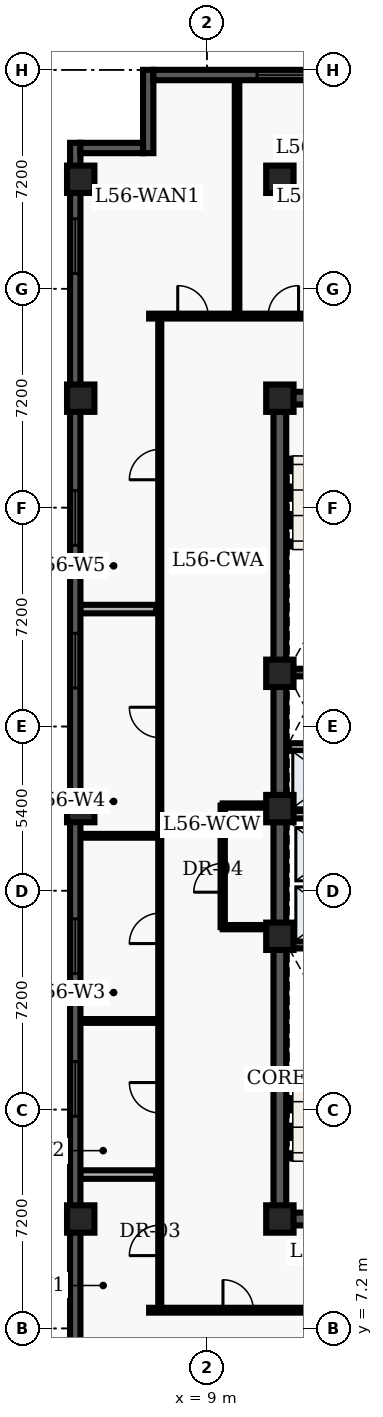
"""IFC4 building model, lengths in metres.
Left out: names, types, materials, properties, quantities, classifications, styles, units other than length and angle.
Written with IfcOpenShell. Run it as: python <this file> out.ifc"""

import sys

from ifc_helpers import new_model, entity, si_unit, converted_unit, direction, frame, origin_with_axes, origin_2d_with_axis, place, context, subcontext, project, spatial, polyline, rectangle, outline, extrude, element, fill, save


model = new_model("IFC4")
c1 = context("Model", 3, precision=1e-05, world=origin_with_axes(), true_north=direction((0.0, 1.0)))
c2 = subcontext(c1, "Body", "Model", "MODEL_VIEW")
j1 = project(units=[si_unit("LENGTHUNIT", "METRE"), converted_unit("PLANEANGLEUNIT", "DEGREE", entity("IfcPlaneAngleMeasure", 0.017), si_unit("PLANEANGLEUNIT", "RADIAN"), dimensions=[0, 0, 0, 0, 0, 0, 0])], contexts=[c1])
p1 = place(None, origin_with_axes())
s1 = spatial("IfcSite", under=j1, at=p1, CompositionType="ELEMENT")
p2 = place(p1, origin_with_axes())
s2 = spatial("IfcBuilding", under=s1, at=p2, CompositionType="ELEMENT")
p3 = place(p2, frame((0.0, 0.0, 228.6), z_axis=(0.0, 0.0, 1.0), x_axis=(1.0, 0.0, 0.0)))
s3 = spatial("IfcBuildingStorey", under=s2, at=p3, CompositionType="ELEMENT", Elevation=228.6)
p4 = place(p3, frame((11.4, 10.8, 0.0), z_axis=(0.0, 0.0, 1.0), x_axis=(0.0, 1.0, 0.0)))
e1 = element("IfcWall", 1, at=p4, inside=s3, PredefinedType="SHEAR", context=c2, shape_type="SweptSolid", body=[
    extrude(outline(polyline([(0.0, -0.21), (27.0, -0.21), (27.0, 0.21), (0.0, 0.21), (0.0, -0.21)])), origin_with_axes(), (0.0, 0.0, 1.0), 3.66),
])
p5 = place(p3, frame((11.4, 10.8, 0.0), z_axis=(0.0, 0.0, 1.0), x_axis=(1.0, 0.0, 0.0)))
e2 = element("IfcWall", 2, at=p5, inside=s3, PredefinedType="SHEAR", context=c2, shape_type="SweptSolid", body=[
    extrude(outline(polyline([(0.0, -0.21), (7.2, -0.21), (7.2, 0.21), (0.0, 0.21), (0.0, -0.21)])), origin_with_axes(), (0.0, 0.0, 1.0), 3.66),
])
p6 = place(p5, frame((2.625, 0.0, 0.0), z_axis=(0.0, 0.0, 1.0), x_axis=(1.0, 0.0, 0.0)))
e3 = element("IfcOpeningElement", 3, at=p6, cuts=e2, PredefinedType="OPENING", context=c2, shape_type="SweptSolid", body=[
    extrude(rectangle(XDim=1.05, YDim=0.44, at=origin_2d_with_axis()), origin_with_axes(), (0.0, 0.0, 1.0), 2.15),
])
p7 = place(p3, frame((11.4, 37.8, 0.0), z_axis=(0.0, 0.0, 1.0), x_axis=(1.0, 0.0, 0.0)))
e4 = element("IfcWall", 4, at=p7, inside=s3, PredefinedType="SHEAR", context=c2, shape_type="SweptSolid", body=[
    extrude(outline(polyline([(0.0, -0.21), (7.2, -0.21), (7.2, 0.21), (0.0, 0.21), (0.0, -0.21)])), origin_with_axes(), (0.0, 0.0, 1.0), 3.66),
])
p8 = place(p7, frame((2.625, 0.0, 0.0), z_axis=(0.0, 0.0, 1.0), x_axis=(1.0, 0.0, 0.0)))
e5 = element("IfcOpeningElement", 5, at=p8, cuts=e4, PredefinedType="OPENING", context=c2, shape_type="SweptSolid", body=[
    extrude(rectangle(XDim=1.05, YDim=0.44, at=origin_2d_with_axis()), origin_with_axes(), (0.0, 0.0, 1.0), 2.15),
])
for number, where, z_axis, x_axis in (
    (6, (11.61, 19.825, 0.0), (0.0, 0.0, 1.0), (1.0, 0.0, 0.0)),
    (7, (11.61, 28.775, 0.0), (0.0, 0.0, 1.0), (1.0, 0.0, 0.0)),
):
    element("IfcWall", number, at=place(p3, frame(where, z_axis=z_axis, x_axis=x_axis)), inside=s3, PredefinedType="SHEAR", context=c2, shape_type="SweptSolid", body=[
        extrude(outline(polyline([(0.0, -0.125), (6.78, -0.125), (6.78, 0.125), (0.0, 0.125), (0.0, -0.125)])), origin_with_axes(), (0.0, 0.0, 1.0), 3.66),
    ])
p9 = place(p3, frame((11.7, 24.1, 0.0), z_axis=(0.0, 0.0, 1.0), x_axis=(1.0, 0.0, 0.0)))
e8 = element("IfcWall", 8, at=p9, inside=s3, PredefinedType="SOLIDWALL", context=c2, shape_type="SweptSolid", body=[
    extrude(outline(polyline([(0.0, -0.125), (6.6, -0.125), (6.6, 0.125), (0.0, 0.125), (0.0, -0.125)])), origin_with_axes(), (0.0, 0.0, 1.0), 2.7),
])
p10 = place(p9, frame((3.75, 0.0, 0.0), z_axis=(0.0, 0.0, 1.0), x_axis=(1.0, 0.0, 0.0)))
e9 = element("IfcOpeningElement", 9, at=p10, cuts=e8, PredefinedType="OPENING", context=c2, shape_type="SweptSolid", body=[
    extrude(rectangle(XDim=0.9, YDim=0.27, at=origin_2d_with_axis()), origin_with_axes(), (0.0, 0.0, 1.0), 2.15),
])
p11 = place(p3, frame((11.7, 26.325, 0.0), z_axis=(0.0, 0.0, 1.0), x_axis=(1.0, 0.0, 0.0)))
e10 = element("IfcWall", 10, at=p11, inside=s3, PredefinedType="SOLIDWALL", context=c2, shape_type="SweptSolid", body=[
    extrude(outline(polyline([(0.0, -0.125), (6.6, -0.125), (6.6, 0.125), (0.0, 0.125), (0.0, -0.125)])), origin_with_axes(), (0.0, 0.0, 1.0), 2.7),
])
p12 = place(p11, frame((3.5, 0.0, 0.0), z_axis=(0.0, 0.0, 1.0), x_axis=(1.0, 0.0, 0.0)))
e11 = element("IfcOpeningElement", 11, at=p12, cuts=e10, PredefinedType="OPENING", context=c2, shape_type="SweptSolid", body=[
    extrude(rectangle(XDim=0.9, YDim=0.27, at=origin_2d_with_axis()), origin_with_axes(), (0.0, 0.0, 1.0), 2.15),
])
for number, where, z_axis, x_axis in (
    (12, (11.4, 10.8, 0.0), (0.0, 0.0, 1.0), (1.0, 0.0, 0.0)),
    (13, (11.4, 20.1, 0.0), (0.0, 0.0, 1.0), (1.0, 0.0, 0.0)),
    (14, (11.4, 24.3, 0.0), (0.0, 0.0, 1.0), (1.0, 0.0, 0.0)),
    (15, (11.4, 28.75, 0.0), (0.0, 0.0, 1.0), (1.0, 0.0, 0.0)),
    (16, (11.4, 37.8, 0.0), (0.0, 0.0, 1.0), (1.0, 0.0, 0.0)),
    (17, (11.4, 45.0, 0.0), (0.0, 0.0, 1.0), (1.0, 0.0, 0.0)),
    (18, (4.85, 10.8, 0.0), (0.0, 0.0, 1.0), (1.0, 0.0, 0.0)),
    (19, (4.85, 24.3, 0.0), (0.0, 0.0, 1.0), (1.0, 0.0, 0.0)),
    (20, (4.85, 37.8, 0.0), (0.0, 0.0, 1.0), (1.0, 0.0, 0.0)),
    (21, (4.85, 45.0, 0.0), (0.0, 0.0, 1.0), (1.0, 0.0, 0.0)),
):
    element("IfcColumn", number, at=place(p3, frame(where, z_axis=z_axis, x_axis=x_axis)), inside=s3, PredefinedType="COLUMN", context=c2, shape_type="SweptSolid", body=[
        extrude(rectangle(XDim=0.9, YDim=0.9, at=origin_2d_with_axis()), origin_with_axes(), (0.0, 0.0, 1.0), 3.9),
    ])
p13 = place(p3, frame((9.52, 20.4, 0.0), z_axis=(0.0, 0.0, 1.0), x_axis=(0.0, 1.0, 0.0)))
e22 = element("IfcWall", 22, at=p13, inside=s3, PredefinedType="PARTITIONING", context=c2, shape_type="SweptSolid", body=[
    extrude(outline(polyline([(0.0, -0.07), (4.0, -0.07), (4.0, 0.07), (0.0, 0.07), (0.0, -0.07)])), origin_with_axes(), (0.0, 0.0, 1.0), 2.7),
])
p14 = place(p13, frame((1.625, 0.0, 0.0), z_axis=(0.0, 0.0, 1.0), x_axis=(1.0, 0.0, 0.0)))
e23 = element("IfcOpeningElement", 23, at=p14, cuts=e22, PredefinedType="OPENING", context=c2, shape_type="SweptSolid", body=[
    extrude(rectangle(XDim=0.95, YDim=0.16, at=origin_2d_with_axis()), origin_with_axes(), (0.0, 0.0, 1.0), 2.15),
])
for number, where, z_axis, x_axis in (
    (24, (9.52, 20.4, 0.0), (0.0, 0.0, 1.0), (1.0, 0.0, 0.0)),
    (25, (9.52, 24.4, 0.0), (0.0, 0.0, 1.0), (1.0, 0.0, 0.0)),
):
    element("IfcWall", number, at=place(p3, frame(where, z_axis=z_axis, x_axis=x_axis)), inside=s3, PredefinedType="PARTITIONING", context=c2, shape_type="SweptSolid", body=[
        extrude(outline(polyline([(0.0, -0.07), (1.58, -0.07), (1.58, 0.07), (0.0, 0.07), (0.0, -0.07)])), origin_with_axes(), (0.0, 0.0, 1.0), 2.7),
    ])
p15 = place(p3, frame((7.1, 7.8, 0.0), z_axis=(0.0, 0.0, 1.0), x_axis=(1.0, 0.0, 0.0)))
e26 = element("IfcWall", 26, at=p15, inside=s3, PredefinedType="PARTITIONING", context=c2, shape_type="SweptSolid", body=[
    extrude(outline(polyline([(0.0, -0.08), (13.2, -0.08), (13.2, 0.08), (0.0, 0.08), (0.0, -0.08)])), origin_with_axes(), (0.0, 0.0, 1.0), 2.7),
])
p16 = place(p15, frame((2.929, 0.0, 0.0), z_axis=(0.0, 0.0, 1.0), x_axis=(1.0, 0.0, 0.0)))
e27 = element("IfcOpeningElement", 27, at=p16, cuts=e26, PredefinedType="OPENING", context=c2, shape_type="SweptSolid", body=[
    extrude(rectangle(XDim=1.0, YDim=0.18, at=origin_2d_with_axis()), origin_with_axes(), (0.0, 0.0, 1.0), 2.15),
])
p17 = place(p15, frame((7.56, 0.0, 0.0), z_axis=(0.0, 0.0, 1.0), x_axis=(1.0, 0.0, 0.0)))
e28 = element("IfcOpeningElement", 28, at=p17, cuts=e26, PredefinedType="OPENING", context=c2, shape_type="SweptSolid", body=[
    extrude(rectangle(XDim=1.0, YDim=0.18, at=origin_2d_with_axis()), origin_with_axes(), (0.0, 0.0, 1.0), 2.15),
])
p18 = place(p15, frame((11.201, 0.0, 0.0), z_axis=(0.0, 0.0, 1.0), x_axis=(1.0, 0.0, 0.0)))
e29 = element("IfcOpeningElement", 29, at=p18, cuts=e26, PredefinedType="OPENING", context=c2, shape_type="SweptSolid", body=[
    extrude(rectangle(XDim=1.0, YDim=0.18, at=origin_2d_with_axis()), origin_with_axes(), (0.0, 0.0, 1.0), 2.15),
])
p19 = place(p3, frame((7.1, 40.5, 0.0), z_axis=(0.0, 0.0, 1.0), x_axis=(1.0, 0.0, 0.0)))
e30 = element("IfcWall", 30, at=p19, inside=s3, PredefinedType="PARTITIONING", context=c2, shape_type="SweptSolid", body=[
    extrude(outline(polyline([(0.0, -0.08), (24.965, -0.08), (24.965, 0.08), (0.0, 0.08), (0.0, -0.08)])), origin_with_axes(), (0.0, 0.0, 1.0), 2.7),
])
p20 = place(p19, frame((1.441, 0.0, 0.0), z_axis=(0.0, 0.0, 1.0), x_axis=(1.0, 0.0, 0.0)))
e31 = element("IfcOpeningElement", 31, at=p20, cuts=e30, PredefinedType="OPENING", context=c2, shape_type="SweptSolid", body=[
    extrude(rectangle(XDim=1.0, YDim=0.18, at=origin_2d_with_axis()), origin_with_axes(), (0.0, 0.0, 1.0), 2.15),
])
p21 = place(p19, frame((4.415, 0.0, 0.0), z_axis=(0.0, 0.0, 1.0), x_axis=(1.0, 0.0, 0.0)))
e32 = element("IfcOpeningElement", 32, at=p21, cuts=e30, PredefinedType="OPENING", context=c2, shape_type="SweptSolid", body=[
    extrude(rectangle(XDim=1.0, YDim=0.18, at=origin_2d_with_axis()), origin_with_axes(), (0.0, 0.0, 1.0), 2.15),
])
p22 = place(p19, frame((7.614, 0.0, 0.0), z_axis=(0.0, 0.0, 1.0), x_axis=(1.0, 0.0, 0.0)))
e33 = element("IfcOpeningElement", 33, at=p22, cuts=e30, PredefinedType="OPENING", context=c2, shape_type="SweptSolid", body=[
    extrude(rectangle(XDim=1.0, YDim=0.18, at=origin_2d_with_axis()), origin_with_axes(), (0.0, 0.0, 1.0), 2.15),
])
p23 = place(p19, frame((11.156, 0.0, 0.0), z_axis=(0.0, 0.0, 1.0), x_axis=(1.0, 0.0, 0.0)))
e34 = element("IfcOpeningElement", 34, at=p23, cuts=e30, PredefinedType="OPENING", context=c2, shape_type="SweptSolid", body=[
    extrude(rectangle(XDim=1.0, YDim=0.18, at=origin_2d_with_axis()), origin_with_axes(), (0.0, 0.0, 1.0), 2.15),
])
p24 = place(p3, frame((7.45, 7.8, 0.0), z_axis=(0.0, 0.0, 1.0), x_axis=(0.0, 1.0, 0.0)))
e35 = element("IfcWall", 35, at=p24, inside=s3, PredefinedType="PARTITIONING", context=c2, shape_type="SweptSolid", body=[
    extrude(outline(polyline([(0.0, -0.05), (32.7, -0.05), (32.7, 0.05), (0.0, 0.05), (0.0, -0.05)])), origin_with_axes(), (0.0, 0.0, 1.0), 2.7),
])
p25 = place(p24, frame((2.296, 0.0, 0.0), z_axis=(0.0, 0.0, 1.0), x_axis=(1.0, 0.0, 0.0)))
e36 = element("IfcOpeningElement", 36, at=p25, cuts=e35, PredefinedType="OPENING", context=c2, shape_type="SweptSolid", body=[
    extrude(rectangle(XDim=1.0, YDim=0.12, at=origin_2d_with_axis()), origin_with_axes(), (0.0, 0.0, 1.0), 2.15),
])
p26 = place(p24, frame((6.989, 0.0, 0.0), z_axis=(0.0, 0.0, 1.0), x_axis=(1.0, 0.0, 0.0)))
e37 = element("IfcOpeningElement", 37, at=p26, cuts=e35, PredefinedType="OPENING", context=c2, shape_type="SweptSolid", body=[
    extrude(rectangle(XDim=1.0, YDim=0.12, at=origin_2d_with_axis()), origin_with_axes(), (0.0, 0.0, 1.0), 2.15),
])
p27 = place(p24, frame((12.56, 0.0, 0.0), z_axis=(0.0, 0.0, 1.0), x_axis=(1.0, 0.0, 0.0)))
e38 = element("IfcOpeningElement", 38, at=p27, cuts=e35, PredefinedType="OPENING", context=c2, shape_type="SweptSolid", body=[
    extrude(rectangle(XDim=1.0, YDim=0.12, at=origin_2d_with_axis()), origin_with_axes(), (0.0, 0.0, 1.0), 2.15),
])
p28 = place(p24, frame((19.334, 0.0, 0.0), z_axis=(0.0, 0.0, 1.0), x_axis=(1.0, 0.0, 0.0)))
e39 = element("IfcOpeningElement", 39, at=p28, cuts=e35, PredefinedType="OPENING", context=c2, shape_type="SweptSolid", body=[
    extrude(rectangle(XDim=1.0, YDim=0.12, at=origin_2d_with_axis()), origin_with_axes(), (0.0, 0.0, 1.0), 2.15),
])
p29 = place(p24, frame((27.817, 0.0, 0.0), z_axis=(0.0, 0.0, 1.0), x_axis=(1.0, 0.0, 0.0)))
e40 = element("IfcOpeningElement", 40, at=p29, cuts=e35, PredefinedType="OPENING", context=c2, shape_type="SweptSolid", body=[
    extrude(rectangle(XDim=1.0, YDim=0.12, at=origin_2d_with_axis()), origin_with_axes(), (0.0, 0.0, 1.0), 2.15),
])
p30 = place(p3, frame((4.835, 12.262, 0.0), z_axis=(0.0, 0.0, 1.0), x_axis=(1.0, 0.0, 0.0)))
e41 = element("IfcWall", 41, at=p30, inside=s3, PredefinedType="PARTITIONING", context=c2, shape_type="SweptSolid", body=[
    extrude(outline(polyline([(0.0, -0.14), (2.495, -0.14), (2.495, 0.14), (0.0, 0.14), (0.0, -0.14)])), origin_with_axes(), (0.0, 0.0, 1.0), 2.7),
])
for number, where, z_axis, x_axis in (
    (42, (4.835, 17.315, 0.0), (0.0, 0.0, 1.0), (1.0, 0.0, 0.0)),
    (43, (4.835, 23.405, 0.0), (0.0, 0.0, 1.0), (1.0, 0.0, 0.0)),
):
    element("IfcWall", number, at=place(p3, frame(where, z_axis=z_axis, x_axis=x_axis)), inside=s3, PredefinedType="PARTITIONING", context=c2, shape_type="SweptSolid", body=[
        extrude(outline(polyline([(0.0, -0.062), (2.495, -0.062), (2.495, 0.062), (0.0, 0.062), (0.0, -0.062)])), origin_with_axes(), (0.0, 0.0, 1.0), 2.7),
    ])
p31 = place(p3, frame((4.835, 30.863, 0.0), z_axis=(0.0, 0.0, 1.0), x_axis=(1.0, 0.0, 0.0)))
e44 = element("IfcWall", 44, at=p31, inside=s3, PredefinedType="PARTITIONING", context=c2, shape_type="SweptSolid", body=[
    extrude(outline(polyline([(0.0, -0.14), (2.495, -0.14), (2.495, 0.14), (0.0, 0.14), (0.0, -0.14)])), origin_with_axes(), (0.0, 0.0, 1.0), 2.7),
])
p32 = place(p3, frame((9.992, 40.6, 0.0), z_axis=(0.0, 0.0, 1.0), x_axis=(0.0, 1.0, 0.0)))
e45 = element("IfcWall", 45, at=p32, inside=s3, PredefinedType="PARTITIONING", context=c2, shape_type="SweptSolid", body=[
    extrude(outline(polyline([(0.0, -0.075), (7.665, -0.075), (7.665, 0.075), (0.0, 0.075), (0.0, -0.075)])), origin_with_axes(), (0.0, 0.0, 1.0), 2.7),
])
p33 = place(p3, frame((4.67, 2.74, 0.0), z_axis=(0.0, 0.0, 1.0), x_axis=(0.0, 1.0, 0.0)))
e46 = element("IfcWall", 46, at=p33, inside=s3, PredefinedType="SOLIDWALL", context=c2, shape_type="SweptSolid", body=[
    extrude(outline(polyline([(0.0, -0.17), (43.46, -0.17), (43.46, 0.17), (0.0, 0.17), (0.0, -0.17)])), origin_with_axes(), (0.0, 0.0, 1.0), 3.66),
])
p34 = place(p33, frame((2.948, 0.0, 0.45), z_axis=(0.0, 0.0, 1.0), x_axis=(1.0, 0.0, 0.0)))
e47 = element("IfcOpeningElement", 47, at=p34, cuts=e46, PredefinedType="OPENING", context=c2, shape_type="SweptSolid", body=[
    extrude(rectangle(XDim=1.8, YDim=0.36, at=origin_2d_with_axis()), origin_with_axes(), (0.0, 0.0, 1.0), 2.1),
])
p35 = place(p33, frame((12.339, 0.0, 0.45), z_axis=(0.0, 0.0, 1.0), x_axis=(1.0, 0.0, 0.0)))
e48 = element("IfcOpeningElement", 48, at=p35, cuts=e46, PredefinedType="OPENING", context=c2, shape_type="SweptSolid", body=[
    extrude(rectangle(XDim=1.8, YDim=0.36, at=origin_2d_with_axis()), origin_with_axes(), (0.0, 0.0, 1.0), 2.1),
])
p36 = place(p33, frame((17.034, 0.0, 0.45), z_axis=(0.0, 0.0, 1.0), x_axis=(1.0, 0.0, 0.0)))
e49 = element("IfcOpeningElement", 49, at=p36, cuts=e46, PredefinedType="OPENING", context=c2, shape_type="SweptSolid", body=[
    extrude(rectangle(XDim=1.8, YDim=0.36, at=origin_2d_with_axis()), origin_with_axes(), (0.0, 0.0, 1.0), 2.1),
])
p37 = place(p33, frame((26.426, 0.0, 0.45), z_axis=(0.0, 0.0, 1.0), x_axis=(1.0, 0.0, 0.0)))
e50 = element("IfcOpeningElement", 50, at=p37, cuts=e46, PredefinedType="OPENING", context=c2, shape_type="SweptSolid", body=[
    extrude(rectangle(XDim=1.8, YDim=0.36, at=origin_2d_with_axis()), origin_with_axes(), (0.0, 0.0, 1.0), 2.1),
])
p38 = place(p33, frame((31.121, 0.0, 0.45), z_axis=(0.0, 0.0, 1.0), x_axis=(1.0, 0.0, 0.0)))
e51 = element("IfcOpeningElement", 51, at=p38, cuts=e46, PredefinedType="OPENING", context=c2, shape_type="SweptSolid", body=[
    extrude(rectangle(XDim=1.8, YDim=0.36, at=origin_2d_with_axis()), origin_with_axes(), (0.0, 0.0, 1.0), 2.1),
])
p39 = place(p33, frame((40.062, 0.0, 0.45), z_axis=(0.0, 0.0, 1.0), x_axis=(1.0, 0.0, 0.0)))
e52 = element("IfcOpeningElement", 52, at=p39, cuts=e46, PredefinedType="OPENING", context=c2, shape_type="SweptSolid", body=[
    extrude(rectangle(XDim=1.8, YDim=0.36, at=origin_2d_with_axis()), origin_with_axes(), (0.0, 0.0, 1.0), 2.1),
])
p40 = place(p3, frame((4.84, 46.03, 0.0), z_axis=(0.0, 0.0, 1.0), x_axis=(1.0, 0.0, 0.0)))
e53 = element("IfcWall", 53, at=p40, inside=s3, PredefinedType="SOLIDWALL", context=c2, shape_type="SweptSolid", body=[
    extrude(outline(polyline([(0.0, -0.17), (2.06, -0.17), (2.06, 0.17), (0.0, 0.17), (0.0, -0.17)])), origin_with_axes(), (0.0, 0.0, 1.0), 3.66),
])
p41 = place(p3, frame((7.07, 45.86, 0.0), z_axis=(0.0, 0.0, 1.0), x_axis=(0.0, 1.0, 0.0)))
e54 = element("IfcWall", 54, at=p41, inside=s3, PredefinedType="SOLIDWALL", context=c2, shape_type="SweptSolid", body=[
    extrude(outline(polyline([(0.0, -0.17), (2.74, -0.17), (2.74, 0.17), (0.0, 0.17), (0.0, -0.17)])), origin_with_axes(), (0.0, 0.0, 1.0), 3.66),
])
p42 = place(p3, frame((7.24, 48.43, 0.0), z_axis=(0.0, 0.0, 1.0), x_axis=(1.0, 0.0, 0.0)))
e55 = element("IfcWall", 55, at=p42, inside=s3, PredefinedType="SOLIDWALL", context=c2, shape_type="SweptSolid", body=[
    extrude(outline(polyline([(0.0, -0.17), (18.36, -0.17), (18.36, 0.17), (0.0, 0.17), (0.0, -0.17)])), origin_with_axes(), (0.0, 0.0, 1.0), 3.66),
])
p43 = place(p42, frame((4.31, 0.0, 0.45), z_axis=(0.0, 0.0, 1.0), x_axis=(1.0, 0.0, 0.0)))
e56 = element("IfcOpeningElement", 56, at=p43, cuts=e55, PredefinedType="OPENING", context=c2, shape_type="SweptSolid", body=[
    extrude(rectangle(XDim=1.8, YDim=0.36, at=origin_2d_with_axis()), origin_with_axes(), (0.0, 0.0, 1.0), 2.1),
])
p44 = place(p42, frame((14.9, 0.0, 0.45), z_axis=(0.0, 0.0, 1.0), x_axis=(1.0, 0.0, 0.0)))
e57 = element("IfcOpeningElement", 57, at=p44, cuts=e55, PredefinedType="OPENING", context=c2, shape_type="SweptSolid", body=[
    extrude(rectangle(XDim=1.8, YDim=0.36, at=origin_2d_with_axis()), origin_with_axes(), (0.0, 0.0, 1.0), 2.1),
])
p45 = place(p13, frame((1.625, 0.0, 0.0), z_axis=(0.0, 0.0, 1.0), x_axis=(1.0, 0.0, 0.0)))
e58 = element("IfcDoor", 58, at=p45, inside=s3, OperationType="SINGLE_SWING_LEFT", PredefinedType="DOOR", context=c2, shape_type="SweptSolid", body=[
    extrude(rectangle(XDim=0.95, YDim=0.084, at=origin_2d_with_axis()), origin_with_axes(), (0.0, 0.0, 1.0), 2.15),
])
fill(e23, e58)
p46 = place(p24, frame((2.296, 0.0, 0.0), z_axis=(0.0, 0.0, 1.0), x_axis=(1.0, 0.0, 0.0)))
e59 = element("IfcDoor", 59, at=p46, inside=s3, OperationType="SINGLE_SWING_LEFT", PredefinedType="DOOR", context=c2, shape_type="SweptSolid", body=[
    extrude(rectangle(XDim=1.0, YDim=0.06, at=origin_2d_with_axis()), origin_with_axes(), (0.0, 0.0, 1.0), 2.15),
])
fill(e36, e59)
p47 = place(p24, frame((6.989, 0.0, 0.0), z_axis=(0.0, 0.0, 1.0), x_axis=(1.0, 0.0, 0.0)))
e60 = element("IfcDoor", 60, at=p47, inside=s3, OperationType="SINGLE_SWING_RIGHT", PredefinedType="DOOR", context=c2, shape_type="SweptSolid", body=[
    extrude(rectangle(XDim=1.0, YDim=0.06, at=origin_2d_with_axis()), origin_with_axes(), (0.0, 0.0, 1.0), 2.15),
])
fill(e37, e60)
p48 = place(p24, frame((12.56, 0.0, 0.0), z_axis=(0.0, 0.0, 1.0), x_axis=(1.0, 0.0, 0.0)))
e61 = element("IfcDoor", 61, at=p48, inside=s3, OperationType="SINGLE_SWING_LEFT", PredefinedType="DOOR", context=c2, shape_type="SweptSolid", body=[
    extrude(rectangle(XDim=1.0, YDim=0.06, at=origin_2d_with_axis()), origin_with_axes(), (0.0, 0.0, 1.0), 2.15),
])
fill(e38, e61)
p49 = place(p24, frame((19.334, 0.0, 0.0), z_axis=(0.0, 0.0, 1.0), x_axis=(1.0, 0.0, 0.0)))
e62 = element("IfcDoor", 62, at=p49, inside=s3, OperationType="SINGLE_SWING_RIGHT", PredefinedType="DOOR", context=c2, shape_type="SweptSolid", body=[
    extrude(rectangle(XDim=1.0, YDim=0.06, at=origin_2d_with_axis()), origin_with_axes(), (0.0, 0.0, 1.0), 2.15),
])
fill(e39, e62)
p50 = place(p24, frame((27.817, 0.0, 0.0), z_axis=(0.0, 0.0, 1.0), x_axis=(1.0, 0.0, 0.0)))
e63 = element("IfcDoor", 63, at=p50, inside=s3, OperationType="SINGLE_SWING_LEFT", PredefinedType="DOOR", context=c2, shape_type="SweptSolid", body=[
    extrude(rectangle(XDim=1.0, YDim=0.06, at=origin_2d_with_axis()), origin_with_axes(), (0.0, 0.0, 1.0), 2.15),
])
fill(e40, e63)
p51 = place(p15, frame((2.929, 0.0, 0.0), z_axis=(0.0, 0.0, 1.0), x_axis=(1.0, 0.0, 0.0)))
e64 = element("IfcDoor", 64, at=p51, inside=s3, OperationType="SINGLE_SWING_LEFT", PredefinedType="DOOR", context=c2, shape_type="SweptSolid", body=[
    extrude(rectangle(XDim=1.0, YDim=0.09, at=origin_2d_with_axis()), origin_with_axes(), (0.0, 0.0, 1.0), 2.15),
])
fill(e27, e64)
p52 = place(p19, frame((1.441, 0.0, 0.0), z_axis=(0.0, 0.0, 1.0), x_axis=(1.0, 0.0, 0.0)))
e65 = element("IfcDoor", 65, at=p52, inside=s3, OperationType="SINGLE_SWING_LEFT", PredefinedType="DOOR", context=c2, shape_type="SweptSolid", body=[
    extrude(rectangle(XDim=1.0, YDim=0.09, at=origin_2d_with_axis()), origin_with_axes(), (0.0, 0.0, 1.0), 2.15),
])
fill(e31, e65)
p53 = place(p19, frame((4.415, 0.0, 0.0), z_axis=(0.0, 0.0, 1.0), x_axis=(1.0, 0.0, 0.0)))
e66 = element("IfcDoor", 66, at=p53, inside=s3, OperationType="SINGLE_SWING_RIGHT", PredefinedType="DOOR", context=c2, shape_type="SweptSolid", body=[
    extrude(rectangle(XDim=1.0, YDim=0.09, at=origin_2d_with_axis()), origin_with_axes(), (0.0, 0.0, 1.0), 2.15),
])
fill(e32, e66)
p54 = place(p33, frame((12.339, 0.0, 0.45), z_axis=(0.0, 0.0, 1.0), x_axis=(1.0, 0.0, 0.0)))
e67 = element("IfcWindow", 67, at=p54, inside=s3, PredefinedType="WINDOW", context=c2, shape_type="SweptSolid", body=[
    extrude(rectangle(XDim=1.8, YDim=0.09, at=origin_2d_with_axis()), origin_with_axes(), (0.0, 0.0, 1.0), 2.1),
])
fill(e48, e67)
p55 = place(p33, frame((17.034, 0.0, 0.45), z_axis=(0.0, 0.0, 1.0), x_axis=(1.0, 0.0, 0.0)))
e68 = element("IfcWindow", 68, at=p55, inside=s3, PredefinedType="WINDOW", context=c2, shape_type="SweptSolid", body=[
    extrude(rectangle(XDim=1.8, YDim=0.09, at=origin_2d_with_axis()), origin_with_axes(), (0.0, 0.0, 1.0), 2.1),
])
fill(e49, e68)
p56 = place(p33, frame((26.426, 0.0, 0.45), z_axis=(0.0, 0.0, 1.0), x_axis=(1.0, 0.0, 0.0)))
e69 = element("IfcWindow", 69, at=p56, inside=s3, PredefinedType="WINDOW", context=c2, shape_type="SweptSolid", body=[
    extrude(rectangle(XDim=1.8, YDim=0.09, at=origin_2d_with_axis()), origin_with_axes(), (0.0, 0.0, 1.0), 2.1),
])
fill(e50, e69)
p57 = place(p33, frame((31.121, 0.0, 0.45), z_axis=(0.0, 0.0, 1.0), x_axis=(1.0, 0.0, 0.0)))
e70 = element("IfcWindow", 70, at=p57, inside=s3, PredefinedType="WINDOW", context=c2, shape_type="SweptSolid", body=[
    extrude(rectangle(XDim=1.8, YDim=0.09, at=origin_2d_with_axis()), origin_with_axes(), (0.0, 0.0, 1.0), 2.1),
])
fill(e51, e70)
p58 = place(p33, frame((40.062, 0.0, 0.45), z_axis=(0.0, 0.0, 1.0), x_axis=(1.0, 0.0, 0.0)))
e71 = element("IfcWindow", 71, at=p58, inside=s3, PredefinedType="WINDOW", context=c2, shape_type="SweptSolid", body=[
    extrude(rectangle(XDim=1.8, YDim=0.09, at=origin_2d_with_axis()), origin_with_axes(), (0.0, 0.0, 1.0), 2.1),
])
fill(e52, e71)
p59 = place(p42, frame((4.31, 0.0, 0.45), z_axis=(0.0, 0.0, 1.0), x_axis=(1.0, 0.0, 0.0)))
e72 = element("IfcWindow", 72, at=p59, inside=s3, PredefinedType="WINDOW", context=c2, shape_type="SweptSolid", body=[
    extrude(rectangle(XDim=1.8, YDim=0.09, at=origin_2d_with_axis()), origin_with_axes(), (0.0, 0.0, 1.0), 2.1),
])
fill(e56, e72)
save(model, sys.argv[1])
